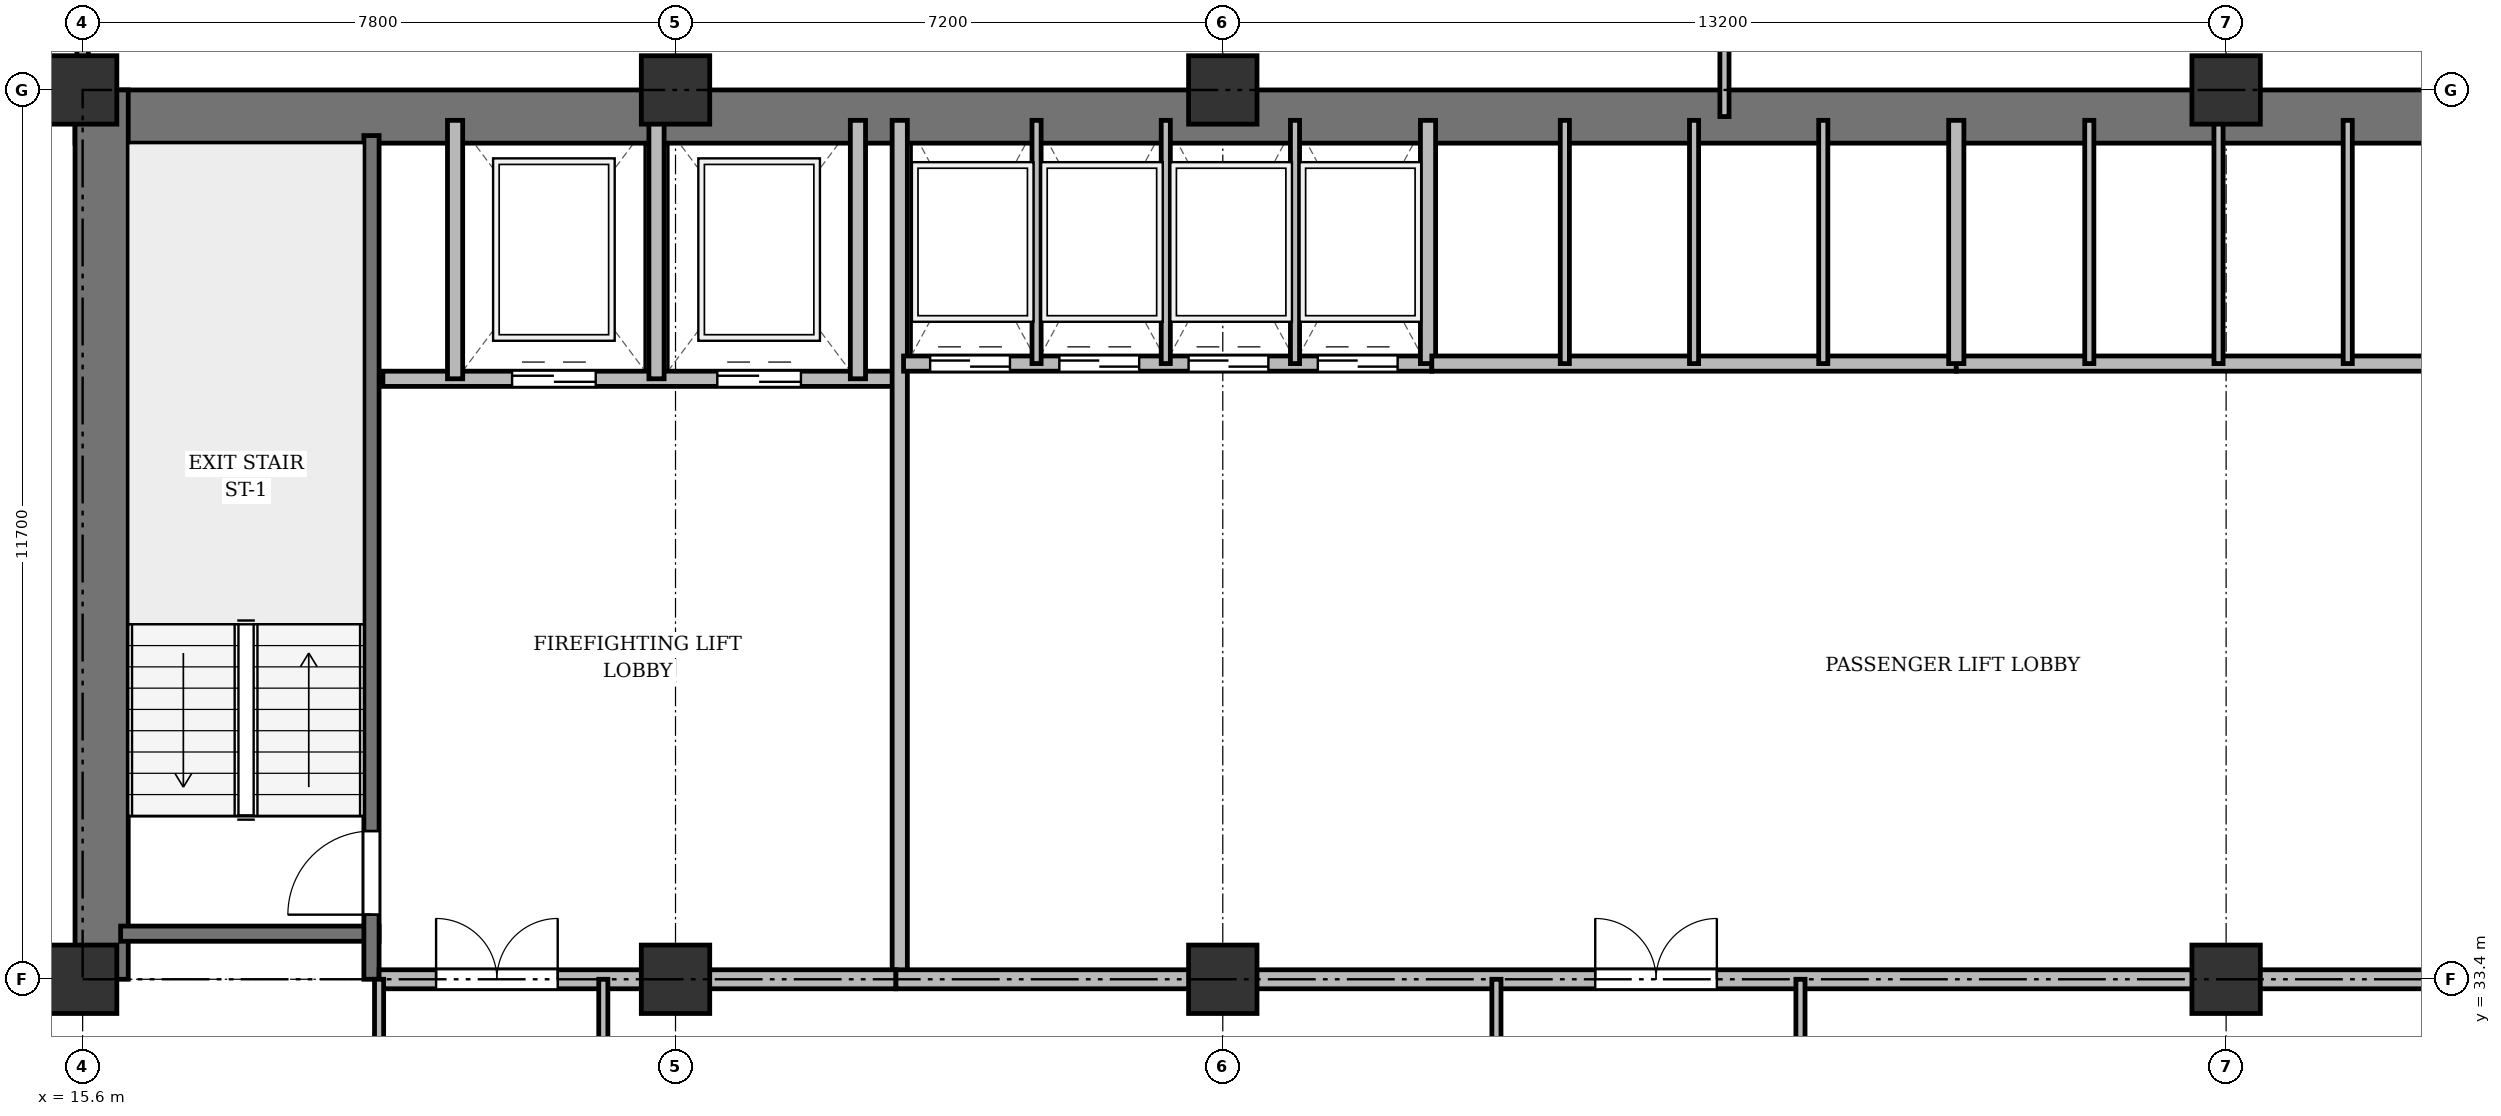
"""IFC4 building model, lengths in metres.
Left out: names, types, materials, properties, quantities, classifications, styles, units other than length and angle.
Written with IfcOpenShell. Run it as: python <this file> out.ifc"""

import sys

from ifc_helpers import new_model, si_unit, direction, frame, frame_2d, origin, origin_2d, place, context, subcontext, project, spatial, rectangle, extrude, source, transform, mapped, element, fill, save


model = new_model("IFC4")
c1 = context("Model", 3, precision=1e-05, world=origin(), true_north=direction((0.0, 1.0)))
c2 = subcontext(c1, "Body", "Model", "MODEL_VIEW")
j1 = project(units=[si_unit("LENGTHUNIT", "METRE"), si_unit("PLANEANGLEUNIT", "RADIAN")], contexts=[c1])
p1 = place(None, origin())
s1 = spatial("IfcSite", under=j1, at=p1, CompositionType="ELEMENT")
p2 = place(p1, origin())
s2 = spatial("IfcBuilding", under=s1, at=p2, CompositionType="ELEMENT")
p3 = place(p2, frame((0.0, 0.0, 52.3)))
s3 = spatial("IfcBuildingStorey", under=s2, at=p3, CompositionType="ELEMENT", Elevation=52.3)
m1 = source(origin(), c2, "Body", "SweptSolid", [
    extrude(rectangle(XDim=0.9, YDim=0.9, at=origin_2d()), origin(), (0.0, 0.0, 1.0), 3.6),
])
for number, where, z_axis, x_axis in (
    (1, (15.6, 33.4, 0.0), (0.0, 0.0, 1.0), (1.0, 0.0, 0.0)),
    (2, (15.6, 45.1, 0.0), (0.0, 0.0, 1.0), (1.0, 0.0, 0.0)),
    (3, (23.4, 33.4, 0.0), (0.0, 0.0, 1.0), (1.0, 0.0, 0.0)),
    (4, (23.4, 45.1, 0.0), (0.0, 0.0, 1.0), (1.0, 0.0, 0.0)),
    (5, (30.6, 33.4, 0.0), (0.0, 0.0, 1.0), (1.0, 0.0, 0.0)),
    (6, (30.6, 45.1, 0.0), (0.0, 0.0, 1.0), (1.0, 0.0, 0.0)),
    (7, (43.8, 33.4, 0.0), (0.0, 0.0, 1.0), (1.0, 0.0, 0.0)),
    (8, (43.8, 45.1, 0.0), (0.0, 0.0, 1.0), (1.0, 0.0, 0.0)),
):
    element("IfcColumn", number, at=place(p3, frame(where, z_axis=z_axis, x_axis=x_axis)), inside=s3, PredefinedType="COLUMN", context=c2, shape_type="MappedRepresentation", body=[
        mapped(m1, transform((0.0, 0.0, 0.0), x_axis=(1.0, 0.0, 0.0), y_axis=(0.0, 1.0, 0.0), z_axis=(0.0, 0.0, 1.0), scale=1.0)),
    ])
p4 = place(p3, frame((15.5, 44.75, 0.0), z_axis=(0.0, 0.0, 1.0), x_axis=(1.0, 0.0, 0.0)))
e9 = element("IfcWall", 9, at=p4, inside=s3, PredefinedType="SHEAR", context=c2, shape_type="SweptSolid", body=[
    extrude(rectangle(XDim=43.4, YDim=0.7, at=frame_2d((21.7, 0.0))), origin(), (0.0, 0.0, 1.0), 3.34),
])
p5 = place(p3, frame((15.85, 33.4, 0.0), z_axis=(0.0, 0.0, 1.0), x_axis=(0.0, 1.0, 0.0)))
e10 = element("IfcWall", 10, at=p5, inside=s3, PredefinedType="SHEAR", context=c2, shape_type="SweptSolid", body=[
    extrude(rectangle(XDim=11.7, YDim=0.7, at=frame_2d((5.85, 0.0))), origin(), (0.0, 0.0, 1.0), 3.34),
])
p6 = place(p3, frame((16.1, 34.0, 0.0), z_axis=(0.0, 0.0, 1.0), x_axis=(1.0, 0.0, 0.0)))
e11 = element("IfcWall", 11, at=p6, inside=s3, PredefinedType="SHEAR", context=c2, shape_type="SweptSolid", body=[
    extrude(rectangle(XDim=3.4, YDim=0.2, at=frame_2d((1.7, 0.0))), origin(), (0.0, 0.0, 1.0), 3.34),
])
p7 = place(p3, frame((19.4, 33.4, 0.0), z_axis=(0.0, 0.0, 1.0), x_axis=(0.0, 1.0, 0.0)))
e12 = element("IfcWall", 12, at=p7, inside=s3, PredefinedType="SHEAR", context=c2, shape_type="SweptSolid", body=[
    extrude(rectangle(XDim=11.1, YDim=0.2, at=frame_2d((5.55, 0.0))), origin(), (0.0, 0.0, 1.0), 3.34),
])
p8 = place(p7, frame((0.85, 0.0, 0.0)))
e13 = element("IfcOpeningElement", 13, at=p8, cuts=e12, PredefinedType="OPENING", context=c2, shape_type="SweptSolid", body=[
    extrude(rectangle(XDim=1.1, YDim=2.15, at=frame_2d((0.55, 1.075))), frame((0.0, 0.11, 0.0), z_axis=(0.0, -1.0, 0.0), x_axis=(1.0, 0.0, 0.0)), (0.0, 0.0, 1.0), 0.22),
])
p9 = place(p3, frame((19.55, 41.3, 0.0), z_axis=(0.0, 0.0, 1.0), x_axis=(1.0, 0.0, 0.0)))
e14 = element("IfcWall", 14, at=p9, inside=s3, PredefinedType="SOLIDWALL", context=c2, shape_type="SweptSolid", body=[
    extrude(rectangle(XDim=6.75, YDim=0.2, at=frame_2d((3.375, 0.0))), origin(), (0.0, 0.0, 1.0), 3.34),
])
p10 = place(p9, frame((1.7, 0.0, 0.0)))
e15 = element("IfcOpeningElement", 15, at=p10, cuts=e14, PredefinedType="OPENING", context=c2, shape_type="SweptSolid", body=[
    extrude(rectangle(XDim=1.1, YDim=2.15, at=frame_2d((0.55, 1.075))), frame((0.0, 0.11, 0.0), z_axis=(0.0, -1.0, 0.0), x_axis=(1.0, 0.0, 0.0)), (0.0, 0.0, 1.0), 0.22),
])
p11 = place(p9, frame((4.4, 0.0, 0.0)))
e16 = element("IfcOpeningElement", 16, at=p11, cuts=e14, PredefinedType="OPENING", context=c2, shape_type="SweptSolid", body=[
    extrude(rectangle(XDim=1.1, YDim=2.15, at=frame_2d((0.55, 1.075))), frame((0.0, 0.11, 0.0), z_axis=(0.0, -1.0, 0.0), x_axis=(1.0, 0.0, 0.0)), (0.0, 0.0, 1.0), 0.22),
])
for number, where, z_axis, x_axis in (
    (17, (20.5, 41.3, 0.0), (0.0, 0.0, 1.0), (0.0, 1.0, 0.0)),
    (18, (23.15, 41.3, 0.0), (0.0, 0.0, 1.0), (0.0, 1.0, 0.0)),
    (19, (25.8, 41.3, 0.0), (0.0, 0.0, 1.0), (0.0, 1.0, 0.0)),
):
    element("IfcWall", number, at=place(p3, frame(where, z_axis=z_axis, x_axis=x_axis)), inside=s3, PredefinedType="SOLIDWALL", context=c2, shape_type="SweptSolid", body=[
        extrude(rectangle(XDim=3.4, YDim=0.2, at=frame_2d((1.7, 0.0))), origin(), (0.0, 0.0, 1.0), 3.34),
    ])
p12 = place(p3, frame((26.35, 33.4, 0.0), z_axis=(0.0, 0.0, 1.0), x_axis=(0.0, 1.0, 0.0)))
e20 = element("IfcWall", 20, at=p12, inside=s3, PredefinedType="SOLIDWALL", context=c2, shape_type="SweptSolid", body=[
    extrude(rectangle(XDim=11.3, YDim=0.2, at=frame_2d((5.65, 0.0))), origin(), (0.0, 0.0, 1.0), 2.69),
])
p13 = place(p3, frame((19.5, 33.4, 0.0), z_axis=(0.0, 0.0, 1.0), x_axis=(1.0, 0.0, 0.0)))
e21 = element("IfcWall", 21, at=p13, inside=s3, PredefinedType="PARTITIONING", context=c2, shape_type="SweptSolid", body=[
    extrude(rectangle(XDim=6.8, YDim=0.25, at=frame_2d((3.4, 0.0))), origin(), (0.0, 0.0, 1.0), 2.69),
])
p14 = place(p13, frame((0.75, 0.0, 0.0)))
e22 = element("IfcOpeningElement", 22, at=p14, cuts=e21, PredefinedType="OPENING", context=c2, shape_type="SweptSolid", body=[
    extrude(rectangle(XDim=1.6, YDim=2.2, at=frame_2d((0.8, 1.1))), frame((0.0, 0.135, 0.0), z_axis=(0.0, -1.0, 0.0), x_axis=(1.0, 0.0, 0.0)), (0.0, 0.0, 1.0), 0.27),
])
p15 = place(p3, frame((26.4, 41.5, 0.0), z_axis=(0.0, 0.0, 1.0), x_axis=(1.0, 0.0, 0.0)))
e23 = element("IfcWall", 23, at=p15, inside=s3, PredefinedType="SOLIDWALL", context=c2, shape_type="SweptSolid", body=[
    extrude(rectangle(XDim=6.95, YDim=0.2, at=frame_2d((3.475, 0.0))), origin(), (0.0, 0.0, 1.0), 3.34),
])
p16 = place(p15, frame((0.35, 0.0, 0.0)))
e24 = element("IfcOpeningElement", 24, at=p16, cuts=e23, PredefinedType="OPENING", context=c2, shape_type="SweptSolid", body=[
    extrude(rectangle(XDim=1.05, YDim=2.15, at=frame_2d((0.525, 1.075))), frame((0.0, 0.11, 0.0), z_axis=(0.0, -1.0, 0.0), x_axis=(1.0, 0.0, 0.0)), (0.0, 0.0, 1.0), 0.22),
])
p17 = place(p15, frame((2.05, 0.0, 0.0)))
e25 = element("IfcOpeningElement", 25, at=p17, cuts=e23, PredefinedType="OPENING", context=c2, shape_type="SweptSolid", body=[
    extrude(rectangle(XDim=1.05, YDim=2.15, at=frame_2d((0.525, 1.075))), frame((0.0, 0.11, 0.0), z_axis=(0.0, -1.0, 0.0), x_axis=(1.0, 0.0, 0.0)), (0.0, 0.0, 1.0), 0.22),
])
p18 = place(p15, frame((3.75, 0.0, 0.0)))
e26 = element("IfcOpeningElement", 26, at=p18, cuts=e23, PredefinedType="OPENING", context=c2, shape_type="SweptSolid", body=[
    extrude(rectangle(XDim=1.05, YDim=2.15, at=frame_2d((0.525, 1.075))), frame((0.0, 0.11, 0.0), z_axis=(0.0, -1.0, 0.0), x_axis=(1.0, 0.0, 0.0)), (0.0, 0.0, 1.0), 0.22),
])
p19 = place(p15, frame((5.45, 0.0, 0.0)))
e27 = element("IfcOpeningElement", 27, at=p19, cuts=e23, PredefinedType="OPENING", context=c2, shape_type="SweptSolid", body=[
    extrude(rectangle(XDim=1.05, YDim=2.15, at=frame_2d((0.525, 1.075))), frame((0.0, 0.11, 0.0), z_axis=(0.0, -1.0, 0.0), x_axis=(1.0, 0.0, 0.0)), (0.0, 0.0, 1.0), 0.22),
])
p20 = place(p3, frame((33.3, 41.5, 0.0), z_axis=(0.0, 0.0, 1.0), x_axis=(0.0, 1.0, 0.0)))
e28 = element("IfcWall", 28, at=p20, inside=s3, PredefinedType="SOLIDWALL", context=c2, shape_type="SweptSolid", body=[
    extrude(rectangle(XDim=3.2, YDim=0.2, at=frame_2d((1.6, 0.0))), origin(), (0.0, 0.0, 1.0), 3.34),
])
for number, where, z_axis, x_axis in (
    (29, (28.15, 41.5, 0.0), (0.0, 0.0, 1.0), (0.0, 1.0, 0.0)),
    (30, (29.85, 41.5, 0.0), (0.0, 0.0, 1.0), (0.0, 1.0, 0.0)),
    (31, (31.55, 41.5, 0.0), (0.0, 0.0, 1.0), (0.0, 1.0, 0.0)),
):
    element("IfcWall", number, at=place(p3, frame(where, z_axis=z_axis, x_axis=x_axis)), inside=s3, PredefinedType="PARTITIONING", context=c2, shape_type="SweptSolid", body=[
        extrude(rectangle(XDim=3.2, YDim=0.12, at=frame_2d((1.6, 0.0))), origin(), (0.0, 0.0, 1.0), 3.34),
    ])
p21 = place(p3, frame((33.35, 41.5, 0.0), z_axis=(0.0, 0.0, 1.0), x_axis=(1.0, 0.0, 0.0)))
e32 = element("IfcWall", 32, at=p21, inside=s3, PredefinedType="SOLIDWALL", context=c2, shape_type="SweptSolid", body=[
    extrude(rectangle(XDim=6.9, YDim=0.2, at=frame_2d((3.45, 0.0))), origin(), (0.0, 0.0, 1.0), 3.34),
])
for number, where, z_axis, x_axis in (
    (33, (35.1, 41.5, 0.0), (0.0, 0.0, 1.0), (0.0, 1.0, 0.0)),
    (34, (36.8, 41.5, 0.0), (0.0, 0.0, 1.0), (0.0, 1.0, 0.0)),
    (35, (38.5, 41.5, 0.0), (0.0, 0.0, 1.0), (0.0, 1.0, 0.0)),
):
    element("IfcWall", number, at=place(p3, frame(where, z_axis=z_axis, x_axis=x_axis)), inside=s3, PredefinedType="PARTITIONING", context=c2, shape_type="SweptSolid", body=[
        extrude(rectangle(XDim=3.2, YDim=0.12, at=frame_2d((1.6, 0.0))), origin(), (0.0, 0.0, 1.0), 3.34),
    ])
p22 = place(p3, frame((40.25, 41.5, 0.0), z_axis=(0.0, 0.0, 1.0), x_axis=(1.0, 0.0, 0.0)))
e36 = element("IfcWall", 36, at=p22, inside=s3, PredefinedType="SOLIDWALL", context=c2, shape_type="SweptSolid", body=[
    extrude(rectangle(XDim=6.9, YDim=0.2, at=frame_2d((3.45, 0.0))), origin(), (0.0, 0.0, 1.0), 2.752),
])
p23 = place(p3, frame((40.25, 41.5, 0.0), z_axis=(0.0, 0.0, 1.0), x_axis=(0.0, 1.0, 0.0)))
e37 = element("IfcWall", 37, at=p23, inside=s3, PredefinedType="SOLIDWALL", context=c2, shape_type="SweptSolid", body=[
    extrude(rectangle(XDim=3.2, YDim=0.2, at=frame_2d((1.6, 0.0))), origin(), (0.0, 0.0, 1.0), 3.34),
])
p24 = place(p3, frame((42.0, 41.5, 0.0), z_axis=(0.0, 0.0, 1.0), x_axis=(0.0, 1.0, 0.0)))
e38 = element("IfcWall", 38, at=p24, inside=s3, PredefinedType="PARTITIONING", context=c2, shape_type="SweptSolid", body=[
    extrude(rectangle(XDim=3.2, YDim=0.12, at=frame_2d((1.6, 0.0))), origin(), (0.0, 0.0, 1.0), 3.34),
])
p25 = place(p3, frame((43.7, 41.5, 0.0), z_axis=(0.0, 0.0, 1.0), x_axis=(0.0, 1.0, 0.0)))
e39 = element("IfcWall", 39, at=p25, inside=s3, PredefinedType="PARTITIONING", context=c2, shape_type="SweptSolid", body=[
    extrude(rectangle(XDim=3.2, YDim=0.12, at=frame_2d((1.6, 0.0))), origin(), (0.0, 0.0, 1.0), 2.752),
])
p26 = place(p3, frame((45.4, 41.5, 0.0), z_axis=(0.0, 0.0, 1.0), x_axis=(0.0, 1.0, 0.0)))
e40 = element("IfcWall", 40, at=p26, inside=s3, PredefinedType="PARTITIONING", context=c2, shape_type="SweptSolid", body=[
    extrude(rectangle(XDim=3.2, YDim=0.12, at=frame_2d((1.6, 0.0))), origin(), (0.0, 0.0, 1.0), 3.34),
])
p27 = place(p3, frame((26.3, 33.4, 0.0), z_axis=(0.0, 0.0, 1.0), x_axis=(1.0, 0.0, 0.0)))
e41 = element("IfcWall", 41, at=p27, inside=s3, PredefinedType="PARTITIONING", context=c2, shape_type="SweptSolid", body=[
    extrude(rectangle(XDim=20.85, YDim=0.25, at=frame_2d((10.425, 0.0))), origin(), (0.0, 0.0, 1.0), 2.69),
])
p28 = place(p27, frame((9.2, 0.0, 0.0)))
e42 = element("IfcOpeningElement", 42, at=p28, cuts=e41, PredefinedType="OPENING", context=c2, shape_type="SweptSolid", body=[
    extrude(rectangle(XDim=1.6, YDim=2.2, at=frame_2d((0.8, 1.1))), frame((0.0, 0.135, 0.0), z_axis=(0.0, -1.0, 0.0), x_axis=(1.0, 0.0, 0.0)), (0.0, 0.0, 1.0), 0.27),
])
for number, where, z_axis, x_axis in (
    (43, (19.5, 29.8, 0.0), (0.0, 0.0, 1.0), (0.0, 1.0, 0.0)),
    (44, (22.45, 29.8, 0.0), (0.0, 0.0, 1.0), (0.0, 1.0, 0.0)),
    (45, (34.2, 29.8, 0.0), (0.0, 0.0, 1.0), (0.0, 1.0, 0.0)),
    (46, (38.2, 29.8, 0.0), (0.0, 0.0, 1.0), (0.0, 1.0, 0.0)),
):
    element("IfcWall", number, at=place(p3, frame(where, z_axis=z_axis, x_axis=x_axis)), inside=s3, PredefinedType="PARTITIONING", context=c2, shape_type="SweptSolid", body=[
        extrude(rectangle(XDim=3.6, YDim=0.12, at=frame_2d((1.8, 0.0))), origin(), (0.0, 0.0, 1.0), 2.69),
    ])
p29 = place(p3, frame((4.75, 33.4, 0.0), z_axis=(0.0, 0.0, 1.0), x_axis=(1.0, 0.0, 0.0)))
e47 = element("IfcWall", 47, at=p29, inside=s3, PredefinedType="PARTITIONING", context=c2, shape_type="SweptSolid", body=[
    extrude(rectangle(XDim=10.85, YDim=0.15, at=frame_2d((5.425, 0.0))), origin(), (0.0, 0.0, 1.0), 2.69),
])
p30 = place(p29, frame((4.94, 0.0, 0.0)))
e48 = element("IfcOpeningElement", 48, at=p30, cuts=e47, PredefinedType="OPENING", context=c2, shape_type="SweptSolid", body=[
    extrude(rectangle(XDim=0.95, YDim=2.15, at=frame_2d((0.475, 1.075))), frame((0.0, 0.085, 0.0), z_axis=(0.0, -1.0, 0.0), x_axis=(1.0, 0.0, 0.0)), (0.0, 0.0, 1.0), 0.17),
])
p31 = place(p3, frame((37.2, 44.75, 0.0), z_axis=(0.0, 0.0, 1.0), x_axis=(0.0, 1.0, 0.0)))
e49 = element("IfcWall", 49, at=p31, inside=s3, PredefinedType="PARTITIONING", context=c2, shape_type="SweptSolid", body=[
    extrude(rectangle(XDim=3.61, YDim=0.12, at=frame_2d((1.805, 0.0))), origin(), (0.0, 0.0, 1.0), 2.69),
])
p32 = place(p31, frame((1.1, 0.0, 0.0)))
e50 = element("IfcOpeningElement", 50, at=p32, cuts=e49, PredefinedType="OPENING", context=c2, shape_type="SweptSolid", body=[
    extrude(rectangle(XDim=0.95, YDim=2.15, at=frame_2d((0.475, 1.075))), frame((0.0, 0.07, 0.0), z_axis=(0.0, -1.0, 0.0), x_axis=(1.0, 0.0, 0.0)), (0.0, 0.0, 1.0), 0.14),
])
p33 = place(p3, frame((15.6, 44.75, 0.0), z_axis=(0.0, 0.0, 1.0), x_axis=(0.0, 1.0, 0.0)))
e51 = element("IfcWall", 51, at=p33, inside=s3, PredefinedType="PARTITIONING", context=c2, shape_type="SweptSolid", body=[
    extrude(rectangle(XDim=3.61, YDim=0.15, at=frame_2d((1.805, 0.0))), origin(), (0.0, 0.0, 1.0), 2.752),
])
p34 = place(p33, frame((1.1, 0.0, 0.0)))
e52 = element("IfcOpeningElement", 52, at=p34, cuts=e51, PredefinedType="OPENING", context=c2, shape_type="SweptSolid", body=[
    extrude(rectangle(XDim=0.95, YDim=2.15, at=frame_2d((0.475, 1.075))), frame((0.0, 0.085, 0.0), z_axis=(0.0, -1.0, 0.0), x_axis=(1.0, 0.0, 0.0)), (0.0, 0.0, 1.0), 0.17),
])
m2 = source(origin(), c2, "Body", "SweptSolid", [
    extrude(rectangle(XDim=1.1, YDim=2.15, at=frame_2d((0.55, 1.075))), frame((0.0, 0.025, 0.0), z_axis=(0.0, -1.0, 0.0), x_axis=(1.0, 0.0, 0.0)), (0.0, 0.0, 1.0), 0.05),
])
p35 = place(p8, origin())
e53 = element("IfcDoor", 53, at=p35, inside=s3, OperationType="SINGLE_SWING_LEFT", PredefinedType="DOOR", context=c2, shape_type="MappedRepresentation", body=[
    mapped(m2, transform((0.0, 0.0, 0.0), x_axis=(1.0, 0.0, 0.0), y_axis=(0.0, 1.0, 0.0), z_axis=(0.0, 0.0, 1.0), scale=1.0)),
])
fill(e13, e53)
p36 = place(p10, origin())
e54 = element("IfcDoor", 54, at=p36, inside=s3, OperationType="DOUBLE_DOOR_SLIDING", PredefinedType="DOOR", context=c2, shape_type="MappedRepresentation", body=[
    mapped(m2, transform((0.0, 0.0, 0.0), x_axis=(1.0, 0.0, 0.0), y_axis=(0.0, 1.0, 0.0), z_axis=(0.0, 0.0, 1.0), scale=1.0)),
])
fill(e15, e54)
p37 = place(p11, origin())
e55 = element("IfcDoor", 55, at=p37, inside=s3, OperationType="DOUBLE_DOOR_SLIDING", PredefinedType="DOOR", context=c2, shape_type="MappedRepresentation", body=[
    mapped(m2, transform((0.0, 0.0, 0.0), x_axis=(1.0, 0.0, 0.0), y_axis=(0.0, 1.0, 0.0), z_axis=(0.0, 0.0, 1.0), scale=1.0)),
])
fill(e16, e55)
m3 = source(origin(), c2, "Body", "SweptSolid", [
    extrude(rectangle(XDim=1.6, YDim=2.2, at=frame_2d((0.8, 1.1))), frame((0.0, 0.025, 0.0), z_axis=(0.0, -1.0, 0.0), x_axis=(1.0, 0.0, 0.0)), (0.0, 0.0, 1.0), 0.05),
])
p38 = place(p14, origin())
e56 = element("IfcDoor", 56, at=p38, inside=s3, OperationType="DOUBLE_DOOR_SINGLE_SWING", PredefinedType="DOOR", context=c2, shape_type="MappedRepresentation", body=[
    mapped(m3, transform((0.0, 0.0, 0.0), x_axis=(1.0, 0.0, 0.0), y_axis=(0.0, 1.0, 0.0), z_axis=(0.0, 0.0, 1.0), scale=1.0)),
])
fill(e22, e56)
m4 = source(origin(), c2, "Body", "SweptSolid", [
    extrude(rectangle(XDim=1.05, YDim=2.15, at=frame_2d((0.525, 1.075))), frame((0.0, 0.025, 0.0), z_axis=(0.0, -1.0, 0.0), x_axis=(1.0, 0.0, 0.0)), (0.0, 0.0, 1.0), 0.05),
])
p39 = place(p16, origin())
e57 = element("IfcDoor", 57, at=p39, inside=s3, OperationType="DOUBLE_DOOR_SLIDING", PredefinedType="DOOR", context=c2, shape_type="MappedRepresentation", body=[
    mapped(m4, transform((0.0, 0.0, 0.0), x_axis=(1.0, 0.0, 0.0), y_axis=(0.0, 1.0, 0.0), z_axis=(0.0, 0.0, 1.0), scale=1.0)),
])
fill(e24, e57)
p40 = place(p17, origin())
e58 = element("IfcDoor", 58, at=p40, inside=s3, OperationType="DOUBLE_DOOR_SLIDING", PredefinedType="DOOR", context=c2, shape_type="MappedRepresentation", body=[
    mapped(m4, transform((0.0, 0.0, 0.0), x_axis=(1.0, 0.0, 0.0), y_axis=(0.0, 1.0, 0.0), z_axis=(0.0, 0.0, 1.0), scale=1.0)),
])
fill(e25, e58)
p41 = place(p18, origin())
e59 = element("IfcDoor", 59, at=p41, inside=s3, OperationType="DOUBLE_DOOR_SLIDING", PredefinedType="DOOR", context=c2, shape_type="MappedRepresentation", body=[
    mapped(m4, transform((0.0, 0.0, 0.0), x_axis=(1.0, 0.0, 0.0), y_axis=(0.0, 1.0, 0.0), z_axis=(0.0, 0.0, 1.0), scale=1.0)),
])
fill(e26, e59)
p42 = place(p19, origin())
e60 = element("IfcDoor", 60, at=p42, inside=s3, OperationType="DOUBLE_DOOR_SLIDING", PredefinedType="DOOR", context=c2, shape_type="MappedRepresentation", body=[
    mapped(m4, transform((0.0, 0.0, 0.0), x_axis=(1.0, 0.0, 0.0), y_axis=(0.0, 1.0, 0.0), z_axis=(0.0, 0.0, 1.0), scale=1.0)),
])
fill(e27, e60)
p43 = place(p28, origin())
e61 = element("IfcDoor", 61, at=p43, inside=s3, OperationType="DOUBLE_DOOR_SINGLE_SWING", PredefinedType="DOOR", context=c2, shape_type="MappedRepresentation", body=[
    mapped(m3, transform((0.0, 0.0, 0.0), x_axis=(1.0, 0.0, 0.0), y_axis=(0.0, 1.0, 0.0), z_axis=(0.0, 0.0, 1.0), scale=1.0)),
])
fill(e42, e61)
save(model, sys.argv[1])
